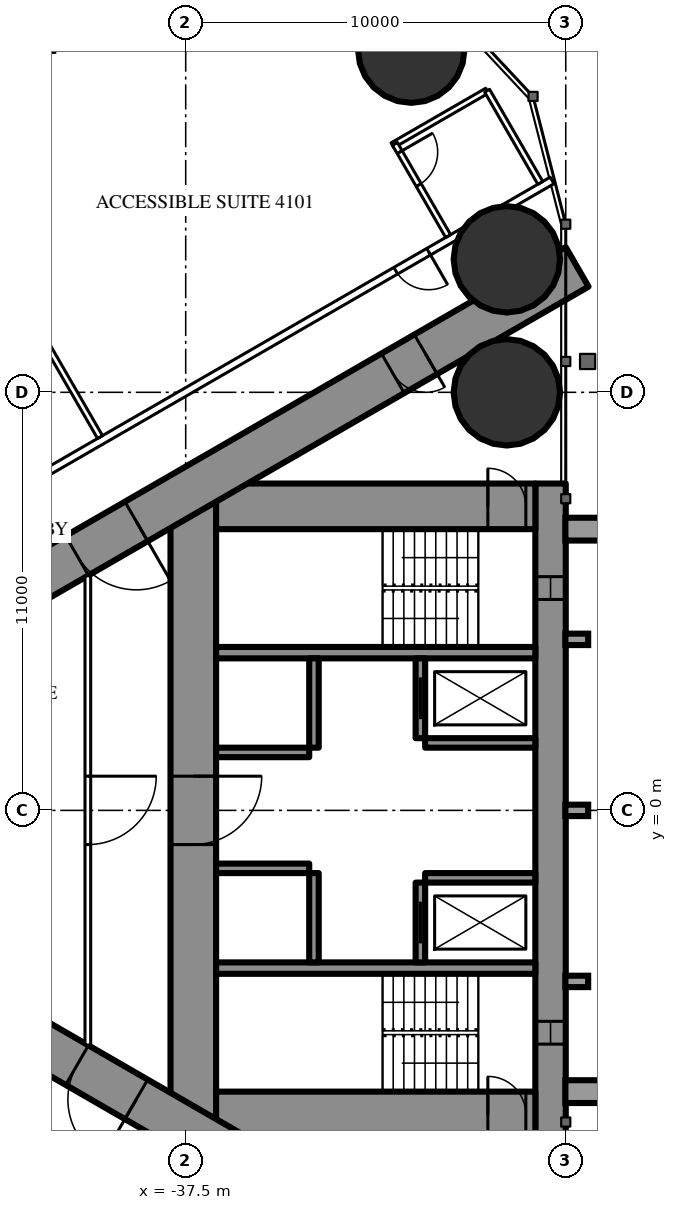
"""IFC4 building model, lengths in metres.
Left out: names, types, materials, properties, quantities, classifications, styles, units other than length and angle.
Written with IfcOpenShell. Run it as: python <this file> out.ifc"""

import sys

from ifc_helpers import new_model, si_unit, direction, frame, frame_2d, origin, origin_2d, place, context, subcontext, project, spatial, rectangle, circle, extrude, element, fill, save


model = new_model("IFC4")
c1 = context("Model", 3, precision=1e-05, world=origin(), true_north=direction((0.0, 1.0)))
c2 = subcontext(c1, "Body", "Model", "MODEL_VIEW")
j1 = project(units=[si_unit("LENGTHUNIT", "METRE"), si_unit("PLANEANGLEUNIT", "RADIAN")], contexts=[c1])
p1 = place(None, origin())
s1 = spatial("IfcSite", under=j1, at=p1, CompositionType="ELEMENT")
p2 = place(p1, origin())
s2 = spatial("IfcBuilding", under=s1, at=p2, CompositionType="ELEMENT")
p3 = place(p2, frame((0.0, 0.0, 156.3)))
s3 = spatial("IfcBuildingStorey", under=s2, at=p3, CompositionType="ELEMENT", Elevation=156.3)
for number, where, z_axis, x_axis in (
    (1, (-31.565, 20.016, 0.0), (0.0, 0.0, 1.0), (1.0, 0.0, 0.0)),
    (2, (-29.05, 11.0, 0.0), (0.0, 0.0, 1.0), (1.0, 0.0, 0.0)),
    (3, (-29.05, 14.5, 0.0), (0.0, 0.0, 1.0), (1.0, 0.0, 0.0)),
):
    element("IfcColumn", number, at=place(p3, frame(where, z_axis=z_axis, x_axis=x_axis)), inside=s3, PredefinedType="COLUMN", context=c2, shape_type="SweptSolid", body=[
        extrude(circle(Radius=1.4, at=origin_2d()), origin(), (0.0, 0.0, 1.0), 3.5),
    ])
p4 = place(p3, frame((-27.9, 8.6, 0.0), z_axis=(0.0, 0.0, 1.0), x_axis=(0.0, -1.0, 0.0)))
e4 = element("IfcWall", 4, at=p4, inside=s3, PredefinedType="SHEAR", context=c2, shape_type="SweptSolid", body=[
    extrude(rectangle(XDim=17.2, YDim=0.8, at=frame_2d((8.6, 0.0))), origin(), (0.0, 0.0, 1.0), 3.5),
])
p5 = place(p4, frame((2.45, 0.0, 0.6)))
e5 = element("IfcOpeningElement", 5, at=p5, cuts=e4, PredefinedType="OPENING", context=c2, shape_type="SweptSolid", body=[
    extrude(rectangle(XDim=0.6, YDim=2.1, at=frame_2d((0.3, 1.05))), frame((0.0, 0.41, 0.0), z_axis=(0.0, -1.0, 0.0), x_axis=(1.0, 0.0, 0.0)), (0.0, 0.0, 1.0), 0.82),
])
p6 = place(p4, frame((14.15, 0.0, 0.6)))
e6 = element("IfcOpeningElement", 6, at=p6, cuts=e4, PredefinedType="OPENING", context=c2, shape_type="SweptSolid", body=[
    extrude(rectangle(XDim=0.6, YDim=2.1, at=frame_2d((0.3, 1.05))), frame((0.0, 0.41, 0.0), z_axis=(0.0, -1.0, 0.0), x_axis=(1.0, 0.0, 0.0)), (0.0, 0.0, 1.0), 0.82),
])
p7 = place(p3, frame((-37.3, 8.6, 0.0), z_axis=(0.0, 0.0, 1.0), x_axis=(0.0, -1.0, 0.0)))
e7 = element("IfcWall", 7, at=p7, inside=s3, PredefinedType="SHEAR", context=c2, shape_type="SweptSolid", body=[
    extrude(rectangle(XDim=17.2, YDim=1.2, at=frame_2d((8.6, 0.0))), origin(), (0.0, 0.0, 1.0), 3.5),
])
p8 = place(p7, frame((7.7, 0.0, 0.0)))
e8 = element("IfcOpeningElement", 8, at=p8, cuts=e7, PredefinedType="OPENING", context=c2, shape_type="SweptSolid", body=[
    extrude(rectangle(XDim=1.8, YDim=2.2, at=frame_2d((0.9, 1.1))), frame((0.0, 0.61, 0.0), z_axis=(0.0, -1.0, 0.0), x_axis=(1.0, 0.0, 0.0)), (0.0, 0.0, 1.0), 1.22),
])
p9 = place(p3, frame((-28.3, 8.0, 0.0), z_axis=(0.0, 0.0, 1.0), x_axis=(-1.0, 0.0, 0.0)))
e9 = element("IfcWall", 9, at=p9, inside=s3, PredefinedType="SHEAR", context=c2, shape_type="SweptSolid", body=[
    extrude(rectangle(XDim=8.4, YDim=1.2, at=frame_2d((4.2, 0.0))), origin(), (0.0, 0.0, 1.0), 3.5),
])
p10 = place(p9, frame((0.25, 0.0, 0.0)))
e10 = element("IfcOpeningElement", 10, at=p10, cuts=e9, PredefinedType="OPENING", context=c2, shape_type="SweptSolid", body=[
    extrude(rectangle(XDim=1.0, YDim=2.2, at=frame_2d((0.5, 1.1))), frame((0.0, 0.61, 0.0), z_axis=(0.0, -1.0, 0.0), x_axis=(1.0, 0.0, 0.0)), (0.0, 0.0, 1.0), 1.22),
])
p11 = place(p3, frame((-28.3, -8.0, 0.0), z_axis=(0.0, 0.0, 1.0), x_axis=(-1.0, 0.0, 0.0)))
e11 = element("IfcWall", 11, at=p11, inside=s3, PredefinedType="SHEAR", context=c2, shape_type="SweptSolid", body=[
    extrude(rectangle(XDim=8.4, YDim=1.2, at=frame_2d((4.2, 0.0))), origin(), (0.0, 0.0, 1.0), 3.5),
])
p12 = place(p11, frame((0.25, 0.0, 0.0)))
e12 = element("IfcOpeningElement", 12, at=p12, cuts=e11, PredefinedType="OPENING", context=c2, shape_type="SweptSolid", body=[
    extrude(rectangle(XDim=1.0, YDim=2.2, at=frame_2d((0.5, 1.1))), frame((0.0, 0.61, 0.0), z_axis=(0.0, -1.0, 0.0), x_axis=(1.0, 0.0, 0.0)), (0.0, 0.0, 1.0), 1.22),
])
for number, where, z_axis, x_axis in (
    (13, (-28.3, 4.15, 0.0), (0.0, 0.0, 1.0), (-1.0, 0.0, 0.0)),
    (14, (-28.3, -4.15, 0.0), (0.0, 0.0, 1.0), (-1.0, 0.0, 0.0)),
):
    element("IfcWall", number, at=place(p3, frame(where, z_axis=z_axis, x_axis=x_axis)), inside=s3, PredefinedType="SHEAR", context=c2, shape_type="SweptSolid", body=[
        extrude(rectangle(XDim=8.4, YDim=0.3, at=frame_2d((4.2, 0.0))), origin(), (0.0, 0.0, 1.0), 3.5),
    ])
p13 = place(p3, frame((-31.325, 4.0, 0.0), z_axis=(0.0, 0.0, 1.0), x_axis=(0.0, -1.0, 0.0)))
e15 = element("IfcWall", 15, at=p13, inside=s3, PredefinedType="SHEAR", context=c2, shape_type="SweptSolid", body=[
    extrude(rectangle(XDim=2.1, YDim=0.25, at=frame_2d((1.05, 0.0))), origin(), (0.0, 0.0, 1.0), 3.5),
])
p14 = place(p13, frame((0.5, 0.0, 0.0)))
e16 = element("IfcOpeningElement", 16, at=p14, cuts=e15, PredefinedType="OPENING", context=c2, shape_type="SweptSolid", body=[
    extrude(rectangle(XDim=1.1, YDim=2.2, at=frame_2d((0.55, 1.1))), frame((0.0, 0.135, 0.0), z_axis=(0.0, -1.0, 0.0), x_axis=(1.0, 0.0, 0.0)), (0.0, 0.0, 1.0), 0.27),
])
p15 = place(p3, frame((-34.125, 4.0, 0.0), z_axis=(0.0, 0.0, 1.0), x_axis=(0.0, -1.0, 0.0)))
e17 = element("IfcWall", 17, at=p15, inside=s3, PredefinedType="SHEAR", context=c2, shape_type="SweptSolid", body=[
    extrude(rectangle(XDim=2.35, YDim=0.25, at=frame_2d((1.175, 0.0))), origin(), (0.0, 0.0, 1.0), 3.5),
])
p16 = place(p3, frame((-28.3, 1.775, 0.0), z_axis=(0.0, 0.0, 1.0), x_axis=(-1.0, 0.0, 0.0)))
e18 = element("IfcWall", 18, at=p16, inside=s3, PredefinedType="SHEAR", context=c2, shape_type="SweptSolid", body=[
    extrude(rectangle(XDim=2.9, YDim=0.25, at=frame_2d((1.45, 0.0))), origin(), (0.0, 0.0, 1.0), 3.5),
])
p17 = place(p3, frame((-34.25, 1.525, 0.0), z_axis=(0.0, 0.0, 1.0), x_axis=(-1.0, 0.0, 0.0)))
e19 = element("IfcWall", 19, at=p17, inside=s3, PredefinedType="SHEAR", context=c2, shape_type="SweptSolid", body=[
    extrude(rectangle(XDim=2.45, YDim=0.25, at=frame_2d((1.225, 0.0))), origin(), (0.0, 0.0, 1.0), 3.5),
])
p18 = place(p3, frame((-31.325, -1.9, 0.0), z_axis=(0.0, 0.0, 1.0), x_axis=(0.0, -1.0, 0.0)))
e20 = element("IfcWall", 20, at=p18, inside=s3, PredefinedType="SHEAR", context=c2, shape_type="SweptSolid", body=[
    extrude(rectangle(XDim=2.1, YDim=0.25, at=frame_2d((1.05, 0.0))), origin(), (0.0, 0.0, 1.0), 3.5),
])
p19 = place(p18, frame((0.5, 0.0, 0.0)))
e21 = element("IfcOpeningElement", 21, at=p19, cuts=e20, PredefinedType="OPENING", context=c2, shape_type="SweptSolid", body=[
    extrude(rectangle(XDim=1.1, YDim=2.2, at=frame_2d((0.55, 1.1))), frame((0.0, 0.135, 0.0), z_axis=(0.0, -1.0, 0.0), x_axis=(1.0, 0.0, 0.0)), (0.0, 0.0, 1.0), 0.27),
])
p20 = place(p3, frame((-34.125, -1.65, 0.0), z_axis=(0.0, 0.0, 1.0), x_axis=(0.0, -1.0, 0.0)))
e22 = element("IfcWall", 22, at=p20, inside=s3, PredefinedType="SHEAR", context=c2, shape_type="SweptSolid", body=[
    extrude(rectangle(XDim=2.35, YDim=0.25, at=frame_2d((1.175, 0.0))), origin(), (0.0, 0.0, 1.0), 3.5),
])
p21 = place(p3, frame((-28.3, -1.775, 0.0), z_axis=(0.0, 0.0, 1.0), x_axis=(-1.0, 0.0, 0.0)))
e23 = element("IfcWall", 23, at=p21, inside=s3, PredefinedType="SHEAR", context=c2, shape_type="SweptSolid", body=[
    extrude(rectangle(XDim=2.9, YDim=0.25, at=frame_2d((1.45, 0.0))), origin(), (0.0, 0.0, 1.0), 3.5),
])
p22 = place(p3, frame((-34.25, -1.525, 0.0), z_axis=(0.0, 0.0, 1.0), x_axis=(-1.0, 0.0, 0.0)))
e24 = element("IfcWall", 24, at=p22, inside=s3, PredefinedType="SHEAR", context=c2, shape_type="SweptSolid", body=[
    extrude(rectangle(XDim=2.45, YDim=0.25, at=frame_2d((1.225, 0.0))), origin(), (0.0, 0.0, 1.0), 3.5),
])
p23 = place(p3, frame((-27.2, 14.3, 0.0), z_axis=(0.0, 0.0, 1.0), x_axis=(-0.866026593062, -0.499997940104, 0.0)))
e25 = element("IfcWall", 25, at=p23, inside=s3, PredefinedType="SHEAR", context=c2, shape_type="SweptSolid", body=[
    extrude(rectangle(XDim=28.946, YDim=1.2, at=frame_2d((14.473, 0.0))), origin(), (0.0, 0.0, 1.0), 3.5),
])
p24 = place(p23, frame((4.6, 0.0, 0.0)))
e26 = element("IfcOpeningElement", 26, at=p24, cuts=e25, PredefinedType="OPENING", context=c2, shape_type="SweptSolid", body=[
    extrude(rectangle(XDim=1.0, YDim=2.2, at=frame_2d((0.5, 1.1))), frame((0.0, 0.61, 0.0), z_axis=(0.0, -1.0, 0.0), x_axis=(1.0, 0.0, 0.0)), (0.0, 0.0, 1.0), 1.22),
])
p25 = place(p23, frame((13.395, 0.0, 0.0)))
e27 = element("IfcOpeningElement", 27, at=p25, cuts=e25, PredefinedType="OPENING", context=c2, shape_type="SweptSolid", body=[
    extrude(rectangle(XDim=1.8, YDim=2.2, at=frame_2d((0.9, 1.1))), frame((0.0, 0.61, 0.0), z_axis=(0.0, -1.0, 0.0), x_axis=(1.0, 0.0, 0.0)), (0.0, 0.0, 1.0), 1.22),
])
p26 = place(p3, frame((-27.2, -14.3, 0.0), z_axis=(0.0, 0.0, 1.0), x_axis=(-0.866024021859, 0.500002393557, 0.0)))
e28 = element("IfcWall", 28, at=p26, inside=s3, PredefinedType="SHEAR", context=c2, shape_type="SweptSolid", body=[
    extrude(rectangle(XDim=27.907, YDim=1.2, at=frame_2d((13.954, 0.0))), origin(), (0.0, 0.0, 1.0), 3.5),
])
p27 = place(p26, frame((4.6, 0.0, 0.0)))
e29 = element("IfcOpeningElement", 29, at=p27, cuts=e28, PredefinedType="OPENING", context=c2, shape_type="SweptSolid", body=[
    extrude(rectangle(XDim=1.0, YDim=2.2, at=frame_2d((0.5, 1.1))), frame((0.0, 0.61, 0.0), z_axis=(0.0, -1.0, 0.0), x_axis=(1.0, 0.0, 0.0)), (0.0, 0.0, 1.0), 1.22),
])
p28 = place(p26, frame((13.395, 0.0, 0.0)))
e30 = element("IfcOpeningElement", 30, at=p28, cuts=e28, PredefinedType="OPENING", context=c2, shape_type="SweptSolid", body=[
    extrude(rectangle(XDim=1.8, YDim=2.2, at=frame_2d((0.9, 1.1))), frame((0.0, 0.61, 0.0), z_axis=(0.0, -1.0, 0.0), x_axis=(1.0, 0.0, 0.0)), (0.0, 0.0, 1.0), 1.22),
])
p29 = place(p3, frame((-27.86, 16.575, 0.0), z_axis=(0.0, 0.0, 1.0), x_axis=(-0.866025533911, -0.499999774615, 0.0)))
e31 = element("IfcWall", 31, at=p29, inside=s3, PredefinedType="PARTITIONING", context=c2, shape_type="SweptSolid", body=[
    extrude(rectangle(XDim=33.149, YDim=0.2, at=frame_2d((16.575, 0.0))), origin(), (0.0, 0.0, 1.0), 3.25),
])
p30 = place(p29, frame((3.75, 0.0, 0.0)))
e32 = element("IfcOpeningElement", 32, at=p30, cuts=e31, PredefinedType="OPENING", context=c2, shape_type="SweptSolid", body=[
    extrude(rectangle(XDim=1.0, YDim=2.2, at=frame_2d((0.5, 1.1))), frame((0.0, 0.11, 0.0), z_axis=(0.0, -1.0, 0.0), x_axis=(1.0, 0.0, 0.0)), (0.0, 0.0, 1.0), 0.22),
])
p31 = place(p29, frame((17.997, 0.0, 0.0)))
e33 = element("IfcOpeningElement", 33, at=p31, cuts=e31, PredefinedType="OPENING", context=c2, shape_type="SweptSolid", body=[
    extrude(rectangle(XDim=0.95, YDim=2.2, at=frame_2d((0.475, 1.1))), frame((0.0, 0.11, 0.0), z_axis=(0.0, -1.0, 0.0), x_axis=(1.0, 0.0, 0.0)), (0.0, 0.0, 1.0), 0.22),
])
p32 = place(p29, frame((22.047, 0.0, 0.0)))
e34 = element("IfcOpeningElement", 34, at=p32, cuts=e31, PredefinedType="OPENING", context=c2, shape_type="SweptSolid", body=[
    extrude(rectangle(XDim=0.95, YDim=2.2, at=frame_2d((0.475, 1.1))), frame((0.0, 0.11, 0.0), z_axis=(0.0, -1.0, 0.0), x_axis=(1.0, 0.0, 0.0)), (0.0, 0.0, 1.0), 0.22),
])
p33 = place(p29, frame((30.042, 0.0, 0.0)))
e35 = element("IfcOpeningElement", 35, at=p33, cuts=e31, PredefinedType="OPENING", context=c2, shape_type="SweptSolid", body=[
    extrude(rectangle(XDim=0.95, YDim=2.2, at=frame_2d((0.475, 1.1))), frame((0.0, 0.11, 0.0), z_axis=(0.0, -1.0, 0.0), x_axis=(1.0, 0.0, 0.0)), (0.0, 0.0, 1.0), 0.22),
])
p34 = place(p3, frame((-39.754, 9.823, 0.0), z_axis=(0.0, 0.0, 1.0), x_axis=(-0.499997670926, 0.866026748472, 0.0)))
e36 = element("IfcWall", 36, at=p34, inside=s3, PredefinedType="PARTITIONING", context=c2, shape_type="SweptSolid", body=[
    extrude(rectangle(XDim=6.757, YDim=0.15, at=frame_2d((3.379, 0.0))), origin(), (0.0, 0.0, 1.0), 2.3),
])
p35 = place(p3, frame((-29.57, 18.936, 0.0), z_axis=(0.0, 0.0, 1.0), x_axis=(-0.866018712932, -0.500011588718, 0.0)))
e37 = element("IfcWall", 37, at=p35, inside=s3, PredefinedType="PARTITIONING", context=c2, shape_type="SweptSolid", body=[
    extrude(rectangle(XDim=2.875, YDim=0.15, at=frame_2d((1.438, 0.0))), origin(), (0.0, 0.0, 1.0), 3.25),
])
p36 = place(p3, frame((-30.595, 15.111, 0.0), z_axis=(0.0, 0.0, 1.0), x_axis=(-0.49998411664, 0.866034573852, 0.0)))
e38 = element("IfcWall", 38, at=p36, inside=s3, PredefinedType="PARTITIONING", context=c2, shape_type="SweptSolid", body=[
    extrude(rectangle(XDim=2.8, YDim=0.15, at=frame_2d((1.4, 0.0))), origin(), (0.0, 0.0, 1.0), 3.25),
])
p37 = place(p36, frame((1.55, 0.0, 0.0)))
e39 = element("IfcOpeningElement", 39, at=p37, cuts=e38, PredefinedType="OPENING", context=c2, shape_type="SweptSolid", body=[
    extrude(rectangle(XDim=1.0, YDim=2.2, at=frame_2d((0.5, 1.1))), frame((0.0, 0.085, 0.0), z_axis=(0.0, -1.0, 0.0), x_axis=(1.0, 0.0, 0.0)), (0.0, 0.0, 1.0), 0.17),
])
p38 = place(p3, frame((-28.17, 16.511, 0.0), z_axis=(0.0, 0.0, 1.0), x_axis=(-0.49994636267, 0.866056369097, 0.0)))
e40 = element("IfcWall", 40, at=p38, inside=s3, PredefinedType="PARTITIONING", context=c2, shape_type="SweptSolid", body=[
    extrude(rectangle(XDim=2.8, YDim=0.15, at=frame_2d((1.4, 0.0))), origin(), (0.0, 0.0, 1.0), 3.25),
])
p39 = place(p3, frame((-40.075, 6.174, 0.0), z_axis=(0.0, 0.0, 1.0), x_axis=(0.0, -1.0, 0.0)))
e41 = element("IfcWall", 41, at=p39, inside=s3, PredefinedType="PARTITIONING", context=c2, shape_type="SweptSolid", body=[
    extrude(rectangle(XDim=12.348, YDim=0.15, at=frame_2d((6.174, 0.0))), origin(), (0.0, 0.0, 1.0), 3.25),
])
p40 = place(p39, frame((5.274, 0.0, 0.0)))
e42 = element("IfcOpeningElement", 42, at=p40, cuts=e41, PredefinedType="OPENING", context=c2, shape_type="SweptSolid", body=[
    extrude(rectangle(XDim=1.8, YDim=2.2, at=frame_2d((0.9, 1.1))), frame((0.0, 0.085, 0.0), z_axis=(0.0, -1.0, 0.0), x_axis=(1.0, 0.0, 0.0)), (0.0, 0.0, 1.0), 0.17),
])
p41 = place(p3, frame((-39.758, -11.697, 0.0), z_axis=(0.0, 0.0, 1.0), x_axis=(-0.866024194504, 0.500002094529, 0.0)))
e43 = element("IfcWall", 43, at=p41, inside=s3, PredefinedType="PARTITIONING", context=c2, shape_type="SweptSolid", body=[
    extrude(rectangle(XDim=6.6, YDim=0.25, at=frame_2d((3.3, 0.0))), origin(), (0.0, 0.0, 1.0), 3.25),
])
p42 = place(p41, frame((0.75, 0.0, 0.0)))
e44 = element("IfcOpeningElement", 44, at=p42, cuts=e43, PredefinedType="OPENING", context=c2, shape_type="SweptSolid", body=[
    extrude(rectangle(XDim=1.1, YDim=2.2, at=frame_2d((0.55, 1.1))), frame((0.0, 0.135, 0.0), z_axis=(0.0, -1.0, 0.0), x_axis=(1.0, 0.0, 0.0)), (0.0, 0.0, 1.0), 0.27),
])
p43 = place(p41, frame((2.75, 0.0, 0.0)))
e45 = element("IfcOpeningElement", 45, at=p43, cuts=e43, PredefinedType="OPENING", context=c2, shape_type="SweptSolid", body=[
    extrude(rectangle(XDim=1.1, YDim=2.2, at=frame_2d((0.55, 1.1))), frame((0.0, 0.135, 0.0), z_axis=(0.0, -1.0, 0.0), x_axis=(1.0, 0.0, 0.0)), (0.0, 0.0, 1.0), 0.27),
])
p44 = place(p41, frame((4.75, 0.0, 0.0)))
e46 = element("IfcOpeningElement", 46, at=p44, cuts=e43, PredefinedType="OPENING", context=c2, shape_type="SweptSolid", body=[
    extrude(rectangle(XDim=1.1, YDim=2.2, at=frame_2d((0.55, 1.1))), frame((0.0, 0.135, 0.0), z_axis=(0.0, -1.0, 0.0), x_axis=(1.0, 0.0, 0.0)), (0.0, 0.0, 1.0), 0.27),
])
p45 = place(p37, origin())
e47 = element("IfcDoor", 47, at=p45, inside=s3, OperationType="SINGLE_SWING_RIGHT", PredefinedType="DOOR", context=c2, shape_type="SweptSolid", body=[
    extrude(rectangle(XDim=1.0, YDim=2.2, at=frame_2d((0.5, 1.1))), frame((0.0, 0.025, 0.0), z_axis=(0.0, -1.0, 0.0), x_axis=(1.0, 0.0, 0.0)), (0.0, 0.0, 1.0), 0.05),
])
fill(e39, e47)
p46 = place(p30, origin())
e48 = element("IfcDoor", 48, at=p46, inside=s3, OperationType="SINGLE_SWING_LEFT", PredefinedType="DOOR", context=c2, shape_type="SweptSolid", body=[
    extrude(rectangle(XDim=1.0, YDim=2.2, at=frame_2d((0.5, 1.1))), frame((0.0, 0.025, 0.0), z_axis=(0.0, -1.0, 0.0), x_axis=(1.0, 0.0, 0.0)), (0.0, 0.0, 1.0), 0.05),
])
fill(e32, e48)
p47 = place(p40, origin())
e49 = element("IfcDoor", 49, at=p47, inside=s3, OperationType="DOUBLE_DOOR_SINGLE_SWING", PredefinedType="DOOR", context=c2, shape_type="SweptSolid", body=[
    extrude(rectangle(XDim=1.8, YDim=2.2, at=frame_2d((0.9, 1.1))), frame((0.0, 0.025, 0.0), z_axis=(0.0, -1.0, 0.0), x_axis=(1.0, 0.0, 0.0)), (0.0, 0.0, 1.0), 0.05),
])
fill(e42, e49)
p48 = place(p24, origin())
e50 = element("IfcDoor", 50, at=p48, inside=s3, OperationType="SINGLE_SWING_LEFT", PredefinedType="DOOR", context=c2, shape_type="SweptSolid", body=[
    extrude(rectangle(XDim=1.0, YDim=2.2, at=frame_2d((0.5, 1.1))), frame((0.0, 0.025, 0.0), z_axis=(0.0, -1.0, 0.0), x_axis=(1.0, 0.0, 0.0)), (0.0, 0.0, 1.0), 0.05),
])
fill(e26, e50)
p49 = place(p25, origin())
e51 = element("IfcDoor", 51, at=p49, inside=s3, OperationType="DOUBLE_DOOR_SINGLE_SWING", PredefinedType="DOOR", context=c2, shape_type="SweptSolid", body=[
    extrude(rectangle(XDim=1.8, YDim=2.2, at=frame_2d((0.9, 1.1))), frame((0.0, 0.025, 0.0), z_axis=(0.0, -1.0, 0.0), x_axis=(1.0, 0.0, 0.0)), (0.0, 0.0, 1.0), 0.05),
])
fill(e27, e51)
p50 = place(p28, origin())
e52 = element("IfcDoor", 52, at=p50, inside=s3, OperationType="DOUBLE_DOOR_SINGLE_SWING", PredefinedType="DOOR", context=c2, shape_type="SweptSolid", body=[
    extrude(rectangle(XDim=1.8, YDim=2.2, at=frame_2d((0.9, 1.1))), frame((0.0, 0.025, 0.0), z_axis=(0.0, -1.0, 0.0), x_axis=(1.0, 0.0, 0.0)), (0.0, 0.0, 1.0), 0.05),
])
fill(e30, e52)
p51 = place(p8, origin())
e53 = element("IfcDoor", 53, at=p51, inside=s3, OperationType="DOUBLE_DOOR_SINGLE_SWING", PredefinedType="DOOR", context=c2, shape_type="SweptSolid", body=[
    extrude(rectangle(XDim=1.8, YDim=2.2, at=frame_2d((0.9, 1.1))), frame((0.0, 0.025, 0.0), z_axis=(0.0, -1.0, 0.0), x_axis=(1.0, 0.0, 0.0)), (0.0, 0.0, 1.0), 0.05),
])
fill(e8, e53)
p52 = place(p10, origin())
e54 = element("IfcDoor", 54, at=p52, inside=s3, OperationType="SINGLE_SWING_RIGHT", PredefinedType="DOOR", context=c2, shape_type="SweptSolid", body=[
    extrude(rectangle(XDim=1.0, YDim=2.2, at=frame_2d((0.5, 1.1))), frame((0.0, 0.025, 0.0), z_axis=(0.0, -1.0, 0.0), x_axis=(1.0, 0.0, 0.0)), (0.0, 0.0, 1.0), 0.05),
])
fill(e10, e54)
p53 = place(p12, origin())
e55 = element("IfcDoor", 55, at=p53, inside=s3, OperationType="SINGLE_SWING_RIGHT", PredefinedType="DOOR", context=c2, shape_type="SweptSolid", body=[
    extrude(rectangle(XDim=1.0, YDim=2.2, at=frame_2d((0.5, 1.1))), frame((0.0, 0.025, 0.0), z_axis=(0.0, -1.0, 0.0), x_axis=(1.0, 0.0, 0.0)), (0.0, 0.0, 1.0), 0.05),
])
fill(e12, e55)
p54 = place(p14, origin())
e56 = element("IfcDoor", 56, at=p54, inside=s3, OperationType="SLIDING_TO_LEFT", PredefinedType="USERDEFINED", context=c2, shape_type="SweptSolid", body=[
    extrude(rectangle(XDim=1.1, YDim=2.2, at=frame_2d((0.55, 1.1))), frame((0.0, 0.025, 0.0), z_axis=(0.0, -1.0, 0.0), x_axis=(1.0, 0.0, 0.0)), (0.0, 0.0, 1.0), 0.05),
])
fill(e16, e56)
p55 = place(p19, origin())
e57 = element("IfcDoor", 57, at=p55, inside=s3, OperationType="SLIDING_TO_LEFT", PredefinedType="USERDEFINED", context=c2, shape_type="SweptSolid", body=[
    extrude(rectangle(XDim=1.1, YDim=2.2, at=frame_2d((0.55, 1.1))), frame((0.0, 0.025, 0.0), z_axis=(0.0, -1.0, 0.0), x_axis=(1.0, 0.0, 0.0)), (0.0, 0.0, 1.0), 0.05),
])
fill(e21, e57)
p56 = place(p5, origin())
e58 = element("IfcWindow", 58, at=p56, inside=s3, PartitioningType="SINGLE_PANEL", PredefinedType="WINDOW", context=c2, shape_type="SweptSolid", body=[
    extrude(rectangle(XDim=0.6, YDim=2.1, at=frame_2d((0.3, 1.05))), frame((0.0, 0.03, 0.0), z_axis=(0.0, -1.0, 0.0), x_axis=(1.0, 0.0, 0.0)), (0.0, 0.0, 1.0), 0.06),
])
fill(e5, e58)
p57 = place(p6, origin())
e59 = element("IfcWindow", 59, at=p57, inside=s3, PartitioningType="SINGLE_PANEL", PredefinedType="WINDOW", context=c2, shape_type="SweptSolid", body=[
    extrude(rectangle(XDim=0.6, YDim=2.1, at=frame_2d((0.3, 1.05))), frame((0.0, 0.03, 0.0), z_axis=(0.0, -1.0, 0.0), x_axis=(1.0, 0.0, 0.0)), (0.0, 0.0, 1.0), 0.06),
])
fill(e6, e59)
save(model, sys.argv[1])
